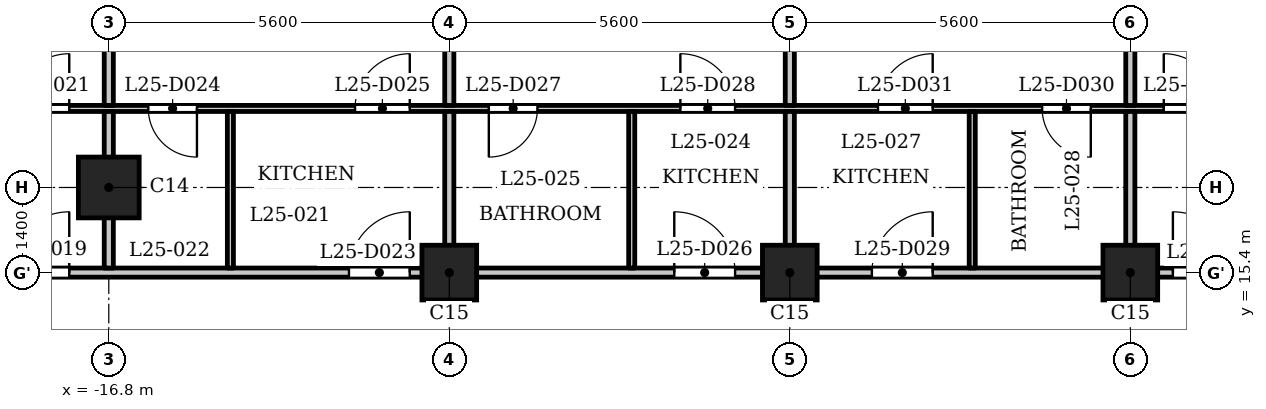
"""IFC4 building model, lengths in metres.
Left out: names, types, materials, properties, quantities, classifications, styles, units other than length and angle.
Written with IfcOpenShell. Run it as: python <this file> out.ifc"""

import sys

from ifc_helpers import new_model, si_unit, direction, frame, frame_2d, origin, origin_2d, place, context, subcontext, project, spatial, rectangle, extrude, element, fill, save


model = new_model("IFC4")
c1 = context("Model", 3, precision=1e-05, world=origin(), true_north=direction((0.0, 1.0)))
c2 = subcontext(c1, "Body", "Model", "MODEL_VIEW")
j1 = project(units=[si_unit("LENGTHUNIT", "METRE"), si_unit("PLANEANGLEUNIT", "RADIAN")], contexts=[c1])
p1 = place(None, origin())
s1 = spatial("IfcSite", under=j1, at=p1, CompositionType="ELEMENT")
p2 = place(p1, origin())
s2 = spatial("IfcBuilding", under=s1, at=p2, CompositionType="ELEMENT")
p3 = place(p2, frame((0.0, 0.0, 100.8)))
s3 = spatial("IfcBuildingStorey", under=s2, at=p3, CompositionType="ELEMENT", Elevation=100.8)
p4 = place(p3, frame((-16.8, 16.8, 0.0), z_axis=(0.0, 0.0, 1.0), x_axis=(1.0, 0.0, 0.0)))
e1 = element("IfcColumn", 1, at=p4, inside=s3, PredefinedType="COLUMN", context=c2, shape_type="SweptSolid", body=[
    extrude(rectangle(XDim=1.0, YDim=1.0, at=origin_2d()), origin(), (0.0, 0.0, 1.0), 3.5),
])
for number, where, z_axis, x_axis in (
    (2, (-11.2, 15.4, 0.0), (0.0, 0.0, 1.0), (1.0, 0.0, 0.0)),
    (3, (-5.6, 15.4, 0.0), (0.0, 0.0, 1.0), (1.0, 0.0, 0.0)),
    (4, (0.0, 15.4, 0.0), (0.0, 0.0, 1.0), (1.0, 0.0, 0.0)),
):
    element("IfcColumn", number, at=place(p3, frame(where, z_axis=z_axis, x_axis=x_axis)), inside=s3, PredefinedType="COLUMN", context=c2, shape_type="SweptSolid", body=[
        extrude(rectangle(XDim=0.9, YDim=0.9, at=origin_2d()), origin(), (0.0, 0.0, 1.0), 3.5),
    ])
p5 = place(p3, frame((-27.484, 15.4, 0.0), z_axis=(0.0, 0.0, 1.0), x_axis=(1.0, 0.0, 0.0)))
e5 = element("IfcWall", 5, at=p5, inside=s3, PredefinedType="PARTITIONING", context=c2, shape_type="SweptSolid", body=[
    extrude(rectangle(XDim=54.968, YDim=0.15, at=frame_2d((27.484, 0.0))), origin(), (0.0, 0.0, 1.0), 3.2),
])
p6 = place(p5, frame((9.034, 0.0, 0.0)))
e6 = element("IfcOpeningElement", 6, at=p6, cuts=e5, PredefinedType="OPENING", context=c2, shape_type="SweptSolid", body=[
    extrude(rectangle(XDim=1.0, YDim=2.1, at=frame_2d((0.5, 1.05))), frame((0.0, 0.085, 0.0), z_axis=(0.0, -1.0, 0.0), x_axis=(1.0, 0.0, 0.0)), (0.0, 0.0, 1.0), 0.17),
])
p7 = place(p5, frame((14.634, 0.0, 0.0)))
e7 = element("IfcOpeningElement", 7, at=p7, cuts=e5, PredefinedType="OPENING", context=c2, shape_type="SweptSolid", body=[
    extrude(rectangle(XDim=1.0, YDim=2.1, at=frame_2d((0.5, 1.05))), frame((0.0, 0.085, 0.0), z_axis=(0.0, -1.0, 0.0), x_axis=(1.0, 0.0, 0.0)), (0.0, 0.0, 1.0), 0.17),
])
p8 = place(p5, frame((19.984, 0.0, 0.0)))
e8 = element("IfcOpeningElement", 8, at=p8, cuts=e5, PredefinedType="OPENING", context=c2, shape_type="SweptSolid", body=[
    extrude(rectangle(XDim=1.0, YDim=2.1, at=frame_2d((0.5, 1.05))), frame((0.0, 0.085, 0.0), z_axis=(0.0, -1.0, 0.0), x_axis=(1.0, 0.0, 0.0)), (0.0, 0.0, 1.0), 0.17),
])
p9 = place(p5, frame((23.234, 0.0, 0.0)))
e9 = element("IfcOpeningElement", 9, at=p9, cuts=e5, PredefinedType="OPENING", context=c2, shape_type="SweptSolid", body=[
    extrude(rectangle(XDim=1.0, YDim=2.1, at=frame_2d((0.5, 1.05))), frame((0.0, 0.085, 0.0), z_axis=(0.0, -1.0, 0.0), x_axis=(1.0, 0.0, 0.0)), (0.0, 0.0, 1.0), 0.17),
])
p10 = place(p5, frame((28.184, 0.0, 0.0)))
e10 = element("IfcOpeningElement", 10, at=p10, cuts=e5, PredefinedType="OPENING", context=c2, shape_type="SweptSolid", body=[
    extrude(rectangle(XDim=1.0, YDim=2.1, at=frame_2d((0.5, 1.05))), frame((0.0, 0.085, 0.0), z_axis=(0.0, -1.0, 0.0), x_axis=(1.0, 0.0, 0.0)), (0.0, 0.0, 1.0), 0.17),
])
p11 = place(p5, frame((39.284, 0.0, 0.0)))
e11 = element("IfcOpeningElement", 11, at=p11, cuts=e5, PredefinedType="OPENING", context=c2, shape_type="SweptSolid", body=[
    extrude(rectangle(XDim=1.0, YDim=2.1, at=frame_2d((0.5, 1.05))), frame((0.0, 0.085, 0.0), z_axis=(0.0, -1.0, 0.0), x_axis=(1.0, 0.0, 0.0)), (0.0, 0.0, 1.0), 0.17),
])
p12 = place(p5, frame((48.234, 0.0, 0.0)))
e12 = element("IfcOpeningElement", 12, at=p12, cuts=e5, PredefinedType="OPENING", context=c2, shape_type="SweptSolid", body=[
    extrude(rectangle(XDim=1.0, YDim=2.1, at=frame_2d((0.5, 1.05))), frame((0.0, 0.085, 0.0), z_axis=(0.0, -1.0, 0.0), x_axis=(1.0, 0.0, 0.0)), (0.0, 0.0, 1.0), 0.17),
])
p13 = place(p3, frame((-26.44, 18.1, 0.0), z_axis=(0.0, 0.0, 1.0), x_axis=(1.0, 0.0, 0.0)))
e13 = element("IfcWall", 13, at=p13, inside=s3, PredefinedType="PARTITIONING", context=c2, shape_type="SweptSolid", body=[
    extrude(rectangle(XDim=52.63, YDim=0.1, at=frame_2d((26.315, 0.0))), origin(), (0.0, 0.0, 1.0), 3.2),
])
p14 = place(p13, frame((2.626, 0.0, 0.0)))
e14 = element("IfcOpeningElement", 14, at=p14, cuts=e13, PredefinedType="OPENING", context=c2, shape_type="SweptSolid", body=[
    extrude(rectangle(XDim=0.8, YDim=2.1, at=frame_2d((0.4, 1.05))), frame((0.0, 0.06, 0.0), z_axis=(0.0, -1.0, 0.0), x_axis=(1.0, 0.0, 0.0)), (0.0, 0.0, 1.0), 0.12),
])
p15 = place(p13, frame((8.09, 0.0, 0.0)))
e15 = element("IfcOpeningElement", 15, at=p15, cuts=e13, PredefinedType="OPENING", context=c2, shape_type="SweptSolid", body=[
    extrude(rectangle(XDim=0.9, YDim=2.1, at=frame_2d((0.45, 1.05))), frame((0.0, 0.06, 0.0), z_axis=(0.0, -1.0, 0.0), x_axis=(1.0, 0.0, 0.0)), (0.0, 0.0, 1.0), 0.12),
])
p16 = place(p13, frame((10.29, 0.0, 0.0)))
e16 = element("IfcOpeningElement", 16, at=p16, cuts=e13, PredefinedType="OPENING", context=c2, shape_type="SweptSolid", body=[
    extrude(rectangle(XDim=0.8, YDim=2.1, at=frame_2d((0.4, 1.05))), frame((0.0, 0.06, 0.0), z_axis=(0.0, -1.0, 0.0), x_axis=(1.0, 0.0, 0.0)), (0.0, 0.0, 1.0), 0.12),
])
p17 = place(p13, frame((13.69, 0.0, 0.0)))
e17 = element("IfcOpeningElement", 17, at=p17, cuts=e13, PredefinedType="OPENING", context=c2, shape_type="SweptSolid", body=[
    extrude(rectangle(XDim=0.9, YDim=2.1, at=frame_2d((0.45, 1.05))), frame((0.0, 0.06, 0.0), z_axis=(0.0, -1.0, 0.0), x_axis=(1.0, 0.0, 0.0)), (0.0, 0.0, 1.0), 0.12),
])
p18 = place(p13, frame((15.89, 0.0, 0.0)))
e18 = element("IfcOpeningElement", 18, at=p18, cuts=e13, PredefinedType="OPENING", context=c2, shape_type="SweptSolid", body=[
    extrude(rectangle(XDim=0.8, YDim=2.1, at=frame_2d((0.4, 1.05))), frame((0.0, 0.06, 0.0), z_axis=(0.0, -1.0, 0.0), x_axis=(1.0, 0.0, 0.0)), (0.0, 0.0, 1.0), 0.12),
])
p19 = place(p13, frame((19.04, 0.0, 0.0)))
e19 = element("IfcOpeningElement", 19, at=p19, cuts=e13, PredefinedType="OPENING", context=c2, shape_type="SweptSolid", body=[
    extrude(rectangle(XDim=0.9, YDim=2.1, at=frame_2d((0.45, 1.05))), frame((0.0, 0.06, 0.0), z_axis=(0.0, -1.0, 0.0), x_axis=(1.0, 0.0, 0.0)), (0.0, 0.0, 1.0), 0.12),
])
p20 = place(p13, frame((24.99, 0.0, 0.0)))
e20 = element("IfcOpeningElement", 20, at=p20, cuts=e13, PredefinedType="OPENING", context=c2, shape_type="SweptSolid", body=[
    extrude(rectangle(XDim=0.8, YDim=2.1, at=frame_2d((0.4, 1.05))), frame((0.0, 0.06, 0.0), z_axis=(0.0, -1.0, 0.0), x_axis=(1.0, 0.0, 0.0)), (0.0, 0.0, 1.0), 0.12),
])
p21 = place(p13, frame((22.29, 0.0, 0.0)))
e21 = element("IfcOpeningElement", 21, at=p21, cuts=e13, PredefinedType="OPENING", context=c2, shape_type="SweptSolid", body=[
    extrude(rectangle(XDim=0.9, YDim=2.1, at=frame_2d((0.45, 1.05))), frame((0.0, 0.06, 0.0), z_axis=(0.0, -1.0, 0.0), x_axis=(1.0, 0.0, 0.0)), (0.0, 0.0, 1.0), 0.12),
])
p22 = place(p13, frame((32.69, 0.0, 0.0)))
e22 = element("IfcOpeningElement", 22, at=p22, cuts=e13, PredefinedType="OPENING", context=c2, shape_type="SweptSolid", body=[
    extrude(rectangle(XDim=0.8, YDim=2.1, at=frame_2d((0.4, 1.05))), frame((0.0, 0.06, 0.0), z_axis=(0.0, -1.0, 0.0), x_axis=(1.0, 0.0, 0.0)), (0.0, 0.0, 1.0), 0.12),
])
p23 = place(p13, frame((26.99, 0.0, 0.0)))
e23 = element("IfcOpeningElement", 23, at=p23, cuts=e13, PredefinedType="OPENING", context=c2, shape_type="SweptSolid", body=[
    extrude(rectangle(XDim=0.9, YDim=2.1, at=frame_2d((0.45, 1.05))), frame((0.0, 0.06, 0.0), z_axis=(0.0, -1.0, 0.0), x_axis=(1.0, 0.0, 0.0)), (0.0, 0.0, 1.0), 0.12),
])
p24 = place(p13, frame((41.29, 0.0, 0.0)))
e24 = element("IfcOpeningElement", 24, at=p24, cuts=e13, PredefinedType="OPENING", context=c2, shape_type="SweptSolid", body=[
    extrude(rectangle(XDim=0.8, YDim=2.1, at=frame_2d((0.4, 1.05))), frame((0.0, 0.06, 0.0), z_axis=(0.0, -1.0, 0.0), x_axis=(1.0, 0.0, 0.0)), (0.0, 0.0, 1.0), 0.12),
])
p25 = place(p13, frame((38.34, 0.0, 0.0)))
e25 = element("IfcOpeningElement", 25, at=p25, cuts=e13, PredefinedType="OPENING", context=c2, shape_type="SweptSolid", body=[
    extrude(rectangle(XDim=0.9, YDim=2.1, at=frame_2d((0.45, 1.05))), frame((0.0, 0.06, 0.0), z_axis=(0.0, -1.0, 0.0), x_axis=(1.0, 0.0, 0.0)), (0.0, 0.0, 1.0), 0.12),
])
p26 = place(p13, frame((50.74, 0.0, 0.0)))
e26 = element("IfcOpeningElement", 26, at=p26, cuts=e13, PredefinedType="OPENING", context=c2, shape_type="SweptSolid", body=[
    extrude(rectangle(XDim=0.8, YDim=2.1, at=frame_2d((0.4, 1.05))), frame((0.0, 0.06, 0.0), z_axis=(0.0, -1.0, 0.0), x_axis=(1.0, 0.0, 0.0)), (0.0, 0.0, 1.0), 0.12),
])
p27 = place(p13, frame((47.29, 0.0, 0.0)))
e27 = element("IfcOpeningElement", 27, at=p27, cuts=e13, PredefinedType="OPENING", context=c2, shape_type="SweptSolid", body=[
    extrude(rectangle(XDim=0.9, YDim=2.1, at=frame_2d((0.45, 1.05))), frame((0.0, 0.06, 0.0), z_axis=(0.0, -1.0, 0.0), x_axis=(1.0, 0.0, 0.0)), (0.0, 0.0, 1.0), 0.12),
])
p28 = place(p3, frame((-16.8, 15.475, 0.0), z_axis=(0.0, 0.0, 1.0), x_axis=(0.0, 1.0, 0.0)))
e28 = element("IfcWall", 28, at=p28, inside=s3, PredefinedType="PARTITIONING", context=c2, shape_type="SweptSolid", body=[
    extrude(rectangle(XDim=2.575, YDim=0.15, at=frame_2d((1.288, 0.0))), origin(), (0.0, 0.0, 1.0), 3.2),
])
p29 = place(p3, frame((-16.8, 18.15, 0.0), z_axis=(0.0, 0.0, 1.0), x_axis=(0.0, 1.0, 0.0)))
e29 = element("IfcWall", 29, at=p29, inside=s3, PredefinedType="PARTITIONING", context=c2, shape_type="SweptSolid", body=[
    extrude(rectangle(XDim=4.88, YDim=0.15, at=frame_2d((2.44, 0.0))), origin(), (0.0, 0.0, 1.0), 3.2),
])
p30 = place(p3, frame((-14.8, 15.475, 0.0), z_axis=(0.0, 0.0, 1.0), x_axis=(0.0, 1.0, 0.0)))
e30 = element("IfcWall", 30, at=p30, inside=s3, PredefinedType="PARTITIONING", context=c2, shape_type="SweptSolid", body=[
    extrude(rectangle(XDim=2.575, YDim=0.1, at=frame_2d((1.288, 0.0))), origin(), (0.0, 0.0, 1.0), 3.2),
])
p31 = place(p3, frame((-11.2, 15.475, 0.0), z_axis=(0.0, 0.0, 1.0), x_axis=(0.0, 1.0, 0.0)))
e31 = element("IfcWall", 31, at=p31, inside=s3, PredefinedType="PARTITIONING", context=c2, shape_type="SweptSolid", body=[
    extrude(rectangle(XDim=2.575, YDim=0.15, at=frame_2d((1.288, 0.0))), origin(), (0.0, 0.0, 1.0), 3.2),
])
p32 = place(p3, frame((-11.2, 18.15, 0.0), z_axis=(0.0, 0.0, 1.0), x_axis=(0.0, 1.0, 0.0)))
e32 = element("IfcWall", 32, at=p32, inside=s3, PredefinedType="PARTITIONING", context=c2, shape_type="SweptSolid", body=[
    extrude(rectangle(XDim=4.88, YDim=0.15, at=frame_2d((2.44, 0.0))), origin(), (0.0, 0.0, 1.0), 3.2),
])
p33 = place(p3, frame((-8.2, 15.475, 0.0), z_axis=(0.0, 0.0, 1.0), x_axis=(0.0, 1.0, 0.0)))
e33 = element("IfcWall", 33, at=p33, inside=s3, PredefinedType="PARTITIONING", context=c2, shape_type="SweptSolid", body=[
    extrude(rectangle(XDim=2.575, YDim=0.1, at=frame_2d((1.288, 0.0))), origin(), (0.0, 0.0, 1.0), 3.2),
])
p34 = place(p3, frame((-5.6, 15.475, 0.0), z_axis=(0.0, 0.0, 1.0), x_axis=(0.0, 1.0, 0.0)))
e34 = element("IfcWall", 34, at=p34, inside=s3, PredefinedType="PARTITIONING", context=c2, shape_type="SweptSolid", body=[
    extrude(rectangle(XDim=2.575, YDim=0.15, at=frame_2d((1.288, 0.0))), origin(), (0.0, 0.0, 1.0), 3.2),
])
p35 = place(p3, frame((-5.6, 18.15, 0.0), z_axis=(0.0, 0.0, 1.0), x_axis=(0.0, 1.0, 0.0)))
e35 = element("IfcWall", 35, at=p35, inside=s3, PredefinedType="PARTITIONING", context=c2, shape_type="SweptSolid", body=[
    extrude(rectangle(XDim=4.88, YDim=0.15, at=frame_2d((2.44, 0.0))), origin(), (0.0, 0.0, 1.0), 3.2),
])
p36 = place(p3, frame((-2.6, 15.475, 0.0), z_axis=(0.0, 0.0, 1.0), x_axis=(0.0, 1.0, 0.0)))
e36 = element("IfcWall", 36, at=p36, inside=s3, PredefinedType="PARTITIONING", context=c2, shape_type="SweptSolid", body=[
    extrude(rectangle(XDim=2.575, YDim=0.1, at=frame_2d((1.288, 0.0))), origin(), (0.0, 0.0, 1.0), 3.2),
])
p37 = place(p3, frame((0.0, 15.475, 0.0), z_axis=(0.0, 0.0, 1.0), x_axis=(0.0, 1.0, 0.0)))
e37 = element("IfcWall", 37, at=p37, inside=s3, PredefinedType="PARTITIONING", context=c2, shape_type="SweptSolid", body=[
    extrude(rectangle(XDim=2.575, YDim=0.15, at=frame_2d((1.288, 0.0))), origin(), (0.0, 0.0, 1.0), 3.2),
])
p38 = place(p3, frame((0.0, 18.15, 0.0), z_axis=(0.0, 0.0, 1.0), x_axis=(0.0, 1.0, 0.0)))
e38 = element("IfcWall", 38, at=p38, inside=s3, PredefinedType="PARTITIONING", context=c2, shape_type="SweptSolid", body=[
    extrude(rectangle(XDim=4.88, YDim=0.15, at=frame_2d((2.44, 0.0))), origin(), (0.0, 0.0, 1.0), 3.2),
])
p39 = place(p6, origin())
e39 = element("IfcDoor", 39, at=p39, inside=s3, OperationType="SINGLE_SWING_LEFT", PredefinedType="DOOR", context=c2, shape_type="SweptSolid", body=[
    extrude(rectangle(XDim=1.0, YDim=2.1, at=frame_2d((0.5, 1.05))), frame((0.0, 0.025, 0.0), z_axis=(0.0, -1.0, 0.0), x_axis=(1.0, 0.0, 0.0)), (0.0, 0.0, 1.0), 0.05),
])
fill(e6, e39)
p40 = place(p15, origin())
e40 = element("IfcDoor", 40, at=p40, inside=s3, OperationType="SINGLE_SWING_LEFT", PredefinedType="DOOR", context=c2, shape_type="SweptSolid", body=[
    extrude(rectangle(XDim=0.9, YDim=2.1, at=frame_2d((0.45, 1.05))), frame((0.0, 0.025, 0.0), z_axis=(0.0, -1.0, 0.0), x_axis=(1.0, 0.0, 0.0)), (0.0, 0.0, 1.0), 0.05),
])
fill(e15, e40)
p41 = place(p7, origin())
e41 = element("IfcDoor", 41, at=p41, inside=s3, OperationType="SINGLE_SWING_LEFT", PredefinedType="DOOR", context=c2, shape_type="SweptSolid", body=[
    extrude(rectangle(XDim=1.0, YDim=2.1, at=frame_2d((0.5, 1.05))), frame((0.0, 0.025, 0.0), z_axis=(0.0, -1.0, 0.0), x_axis=(1.0, 0.0, 0.0)), (0.0, 0.0, 1.0), 0.05),
])
fill(e7, e41)
p42 = place(p16, origin())
e42 = element("IfcDoor", 42, at=p42, inside=s3, OperationType="SINGLE_SWING_RIGHT", PredefinedType="DOOR", context=c2, shape_type="SweptSolid", body=[
    extrude(rectangle(XDim=0.8, YDim=2.1, at=frame_2d((0.4, 1.05))), frame((0.0, 0.025, 0.0), z_axis=(0.0, -1.0, 0.0), x_axis=(1.0, 0.0, 0.0)), (0.0, 0.0, 1.0), 0.05),
])
fill(e16, e42)
p43 = place(p17, origin())
e43 = element("IfcDoor", 43, at=p43, inside=s3, OperationType="SINGLE_SWING_LEFT", PredefinedType="DOOR", context=c2, shape_type="SweptSolid", body=[
    extrude(rectangle(XDim=0.9, YDim=2.1, at=frame_2d((0.45, 1.05))), frame((0.0, 0.025, 0.0), z_axis=(0.0, -1.0, 0.0), x_axis=(1.0, 0.0, 0.0)), (0.0, 0.0, 1.0), 0.05),
])
fill(e17, e43)
p44 = place(p8, origin())
e44 = element("IfcDoor", 44, at=p44, inside=s3, OperationType="SINGLE_SWING_RIGHT", PredefinedType="DOOR", context=c2, shape_type="SweptSolid", body=[
    extrude(rectangle(XDim=1.0, YDim=2.1, at=frame_2d((0.5, 1.05))), frame((0.0, 0.025, 0.0), z_axis=(0.0, -1.0, 0.0), x_axis=(1.0, 0.0, 0.0)), (0.0, 0.0, 1.0), 0.05),
])
fill(e8, e44)
p45 = place(p18, origin())
e45 = element("IfcDoor", 45, at=p45, inside=s3, OperationType="SINGLE_SWING_LEFT", PredefinedType="DOOR", context=c2, shape_type="SweptSolid", body=[
    extrude(rectangle(XDim=0.8, YDim=2.1, at=frame_2d((0.4, 1.05))), frame((0.0, 0.025, 0.0), z_axis=(0.0, -1.0, 0.0), x_axis=(1.0, 0.0, 0.0)), (0.0, 0.0, 1.0), 0.05),
])
fill(e18, e45)
p46 = place(p19, origin())
e46 = element("IfcDoor", 46, at=p46, inside=s3, OperationType="SINGLE_SWING_RIGHT", PredefinedType="DOOR", context=c2, shape_type="SweptSolid", body=[
    extrude(rectangle(XDim=0.9, YDim=2.1, at=frame_2d((0.45, 1.05))), frame((0.0, 0.025, 0.0), z_axis=(0.0, -1.0, 0.0), x_axis=(1.0, 0.0, 0.0)), (0.0, 0.0, 1.0), 0.05),
])
fill(e19, e46)
p47 = place(p9, origin())
e47 = element("IfcDoor", 47, at=p47, inside=s3, OperationType="SINGLE_SWING_LEFT", PredefinedType="DOOR", context=c2, shape_type="SweptSolid", body=[
    extrude(rectangle(XDim=1.0, YDim=2.1, at=frame_2d((0.5, 1.05))), frame((0.0, 0.025, 0.0), z_axis=(0.0, -1.0, 0.0), x_axis=(1.0, 0.0, 0.0)), (0.0, 0.0, 1.0), 0.05),
])
fill(e9, e47)
p48 = place(p20, origin())
e48 = element("IfcDoor", 48, at=p48, inside=s3, OperationType="SINGLE_SWING_RIGHT", PredefinedType="DOOR", context=c2, shape_type="SweptSolid", body=[
    extrude(rectangle(XDim=0.8, YDim=2.1, at=frame_2d((0.4, 1.05))), frame((0.0, 0.025, 0.0), z_axis=(0.0, -1.0, 0.0), x_axis=(1.0, 0.0, 0.0)), (0.0, 0.0, 1.0), 0.05),
])
fill(e20, e48)
p49 = place(p21, origin())
e49 = element("IfcDoor", 49, at=p49, inside=s3, OperationType="SINGLE_SWING_LEFT", PredefinedType="DOOR", context=c2, shape_type="SweptSolid", body=[
    extrude(rectangle(XDim=0.9, YDim=2.1, at=frame_2d((0.45, 1.05))), frame((0.0, 0.025, 0.0), z_axis=(0.0, -1.0, 0.0), x_axis=(1.0, 0.0, 0.0)), (0.0, 0.0, 1.0), 0.05),
])
fill(e21, e49)
p50 = place(p10, origin())
e50 = element("IfcDoor", 50, at=p50, inside=s3, OperationType="SINGLE_SWING_RIGHT", PredefinedType="DOOR", context=c2, shape_type="SweptSolid", body=[
    extrude(rectangle(XDim=1.0, YDim=2.1, at=frame_2d((0.5, 1.05))), frame((0.0, 0.025, 0.0), z_axis=(0.0, -1.0, 0.0), x_axis=(1.0, 0.0, 0.0)), (0.0, 0.0, 1.0), 0.05),
])
fill(e10, e50)
p51 = place(p23, origin())
e51 = element("IfcDoor", 51, at=p51, inside=s3, OperationType="SINGLE_SWING_RIGHT", PredefinedType="DOOR", context=c2, shape_type="SweptSolid", body=[
    extrude(rectangle(XDim=0.9, YDim=2.1, at=frame_2d((0.45, 1.05))), frame((0.0, 0.025, 0.0), z_axis=(0.0, -1.0, 0.0), x_axis=(1.0, 0.0, 0.0)), (0.0, 0.0, 1.0), 0.05),
])
fill(e23, e51)
save(model, sys.argv[1])
